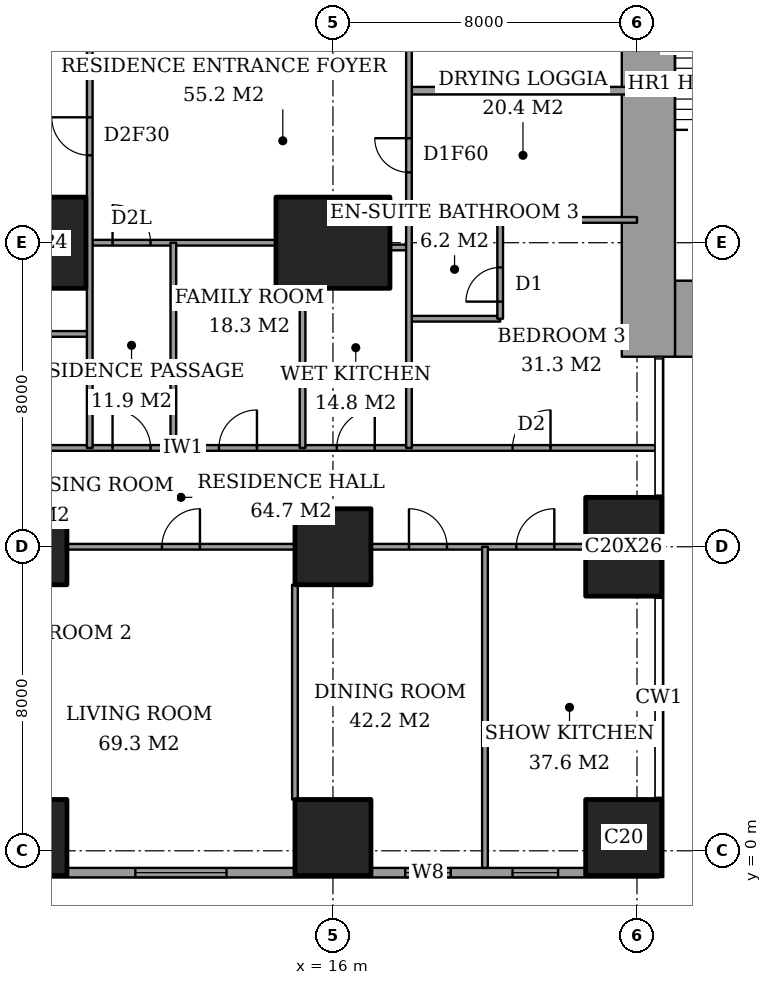
"""IFC4 building model, lengths in metres.
Left out: names, types, materials, properties, quantities, classifications, styles, units other than length and angle.
Written with IfcOpenShell. Run it as: python <this file> out.ifc"""

import sys

from ifc_helpers import new_model, si_unit, direction, frame, frame_2d, origin, origin_2d, place, context, subcontext, project, spatial, rectangle, extrude, element, fill, save


model = new_model("IFC4")
c1 = context("Model", 3, precision=1e-05, world=origin(), true_north=direction((0.0, 1.0)))
c2 = subcontext(c1, "Body", "Model", "MODEL_VIEW")
j1 = project(units=[si_unit("LENGTHUNIT", "METRE"), si_unit("PLANEANGLEUNIT", "RADIAN")], contexts=[c1])
p1 = place(None, origin())
s1 = spatial("IfcSite", under=j1, at=p1, CompositionType="ELEMENT")
p2 = place(p1, origin())
s2 = spatial("IfcBuilding", under=s1, at=p2, CompositionType="ELEMENT")
p3 = place(p2, frame((0.0, 0.0, 87.2)))
s3 = spatial("IfcBuildingStorey", under=s2, at=p3, CompositionType="ELEMENT", Elevation=87.2)
for number, where, z_axis, x_axis in (
    (1, (8.0, 0.35, 0.0), (0.0, 0.0, 1.0), (1.0, 0.0, 0.0)),
    (2, (8.0, 8.0, 0.0), (0.0, 0.0, 1.0), (1.0, 0.0, 0.0)),
):
    element("IfcColumn", number, at=place(p3, frame(where, z_axis=z_axis, x_axis=x_axis)), inside=s3, PredefinedType="COLUMN", context=c2, shape_type="SweptSolid", body=[
        extrude(rectangle(XDim=2.0, YDim=2.0, at=origin_2d()), origin(), (0.0, 0.0, 1.0), 3.6),
    ])
p4 = place(p3, frame((8.0, 16.0, 0.0), z_axis=(0.0, 0.0, 1.0), x_axis=(1.0, 0.0, 0.0)))
e3 = element("IfcColumn", 3, at=p4, inside=s3, PredefinedType="COLUMN", context=c2, shape_type="SweptSolid", body=[
    extrude(rectangle(XDim=3.0, YDim=2.4, at=origin_2d()), origin(), (0.0, 0.0, 1.0), 3.6),
])
for number, where, z_axis, x_axis in (
    (4, (16.0, 0.35, 0.0), (0.0, 0.0, 1.0), (1.0, 0.0, 0.0)),
    (5, (16.0, 8.0, 0.0), (0.0, 0.0, 1.0), (1.0, 0.0, 0.0)),
):
    element("IfcColumn", number, at=place(p3, frame(where, z_axis=z_axis, x_axis=x_axis)), inside=s3, PredefinedType="COLUMN", context=c2, shape_type="SweptSolid", body=[
        extrude(rectangle(XDim=2.0, YDim=2.0, at=origin_2d()), origin(), (0.0, 0.0, 1.0), 3.6),
    ])
p5 = place(p3, frame((16.0, 16.0, 0.0), z_axis=(0.0, 0.0, 1.0), x_axis=(1.0, 0.0, 0.0)))
e6 = element("IfcColumn", 6, at=p5, inside=s3, PredefinedType="COLUMN", context=c2, shape_type="SweptSolid", body=[
    extrude(rectangle(XDim=3.0, YDim=2.4, at=origin_2d()), origin(), (0.0, 0.0, 1.0), 3.6),
])
p6 = place(p3, frame((23.65, 0.35, 0.0), z_axis=(0.0, 0.0, 1.0), x_axis=(1.0, 0.0, 0.0)))
e7 = element("IfcColumn", 7, at=p6, inside=s3, PredefinedType="COLUMN", context=c2, shape_type="SweptSolid", body=[
    extrude(rectangle(XDim=2.0, YDim=2.0, at=origin_2d()), origin(), (0.0, 0.0, 1.0), 3.6),
])
p7 = place(p3, frame((23.65, 8.0, 0.0), z_axis=(0.0, 0.0, 1.0), x_axis=(1.0, 0.0, 0.0)))
e8 = element("IfcColumn", 8, at=p7, inside=s3, PredefinedType="COLUMN", context=c2, shape_type="SweptSolid", body=[
    extrude(rectangle(XDim=2.0, YDim=2.6, at=origin_2d()), origin(), (0.0, 0.0, 1.0), 3.6),
])
p8 = place(p3, frame((25.0, 14.0, 0.0), z_axis=(0.0, 0.0, 1.0), x_axis=(1.0, 0.0, 0.0)))
e9 = element("IfcWall", 9, at=p8, inside=s3, PredefinedType="SHEAR", context=c2, shape_type="SweptSolid", body=[
    extrude(rectangle(XDim=3.15, YDim=2.0, at=frame_2d((1.575, 0.0))), origin(), (0.0, 0.0, 1.0), 3.6),
])
p9 = place(p3, frame((24.3, 13.0, 0.0), z_axis=(0.0, 0.0, 1.0), x_axis=(0.0, 1.0, 0.0)))
e10 = element("IfcWall", 10, at=p9, inside=s3, PredefinedType="SHEAR", context=c2, shape_type="SweptSolid", body=[
    extrude(rectangle(XDim=10.15, YDim=1.4, at=frame_2d((5.075, 0.0))), origin(), (0.0, 0.0, 1.0), 3.6),
])
p10 = place(p3, frame((3.175, -0.575, 0.0), z_axis=(0.0, 0.0, 1.0), x_axis=(1.0, 0.0, 0.0)))
e11 = element("IfcWall", 11, at=p10, inside=s3, PredefinedType="SOLIDWALL", context=c2, shape_type="SweptSolid", body=[
    extrude(rectangle(XDim=21.4, YDim=0.25, at=frame_2d((10.7, 0.0))), origin(), (0.0, 0.0, 1.0), 3.6),
])
p11 = place(p10, frame((0.425, 0.0, 0.6)))
e12 = element("IfcOpeningElement", 12, at=p11, cuts=e11, PredefinedType="OPENING", context=c2, shape_type="SweptSolid", body=[
    extrude(rectangle(XDim=1.2, YDim=2.0, at=frame_2d((0.6, 1.0))), frame((0.0, 0.135, 0.0), z_axis=(0.0, -1.0, 0.0), x_axis=(1.0, 0.0, 0.0)), (0.0, 0.0, 1.0), 0.27),
])
p12 = place(p10, frame((2.1, 0.0, 0.6)))
e13 = element("IfcOpeningElement", 13, at=p12, cuts=e11, PredefinedType="OPENING", context=c2, shape_type="SweptSolid", body=[
    extrude(rectangle(XDim=1.2, YDim=2.0, at=frame_2d((0.6, 1.0))), frame((0.0, 0.135, 0.0), z_axis=(0.0, -1.0, 0.0), x_axis=(1.0, 0.0, 0.0)), (0.0, 0.0, 1.0), 0.27),
])
p13 = place(p10, frame((7.625, 0.0, 0.6)))
e14 = element("IfcOpeningElement", 14, at=p13, cuts=e11, PredefinedType="OPENING", context=c2, shape_type="SweptSolid", body=[
    extrude(rectangle(XDim=2.4, YDim=2.0, at=frame_2d((1.2, 1.0))), frame((0.0, 0.135, 0.0), z_axis=(0.0, -1.0, 0.0), x_axis=(1.0, 0.0, 0.0)), (0.0, 0.0, 1.0), 0.27),
])
p14 = place(p10, frame((14.725, 0.0, 0.6)))
e15 = element("IfcOpeningElement", 15, at=p14, cuts=e11, PredefinedType="OPENING", context=c2, shape_type="SweptSolid", body=[
    extrude(rectangle(XDim=1.2, YDim=2.0, at=frame_2d((0.6, 1.0))), frame((0.0, 0.135, 0.0), z_axis=(0.0, -1.0, 0.0), x_axis=(1.0, 0.0, 0.0)), (0.0, 0.0, 1.0), 0.27),
])
p15 = place(p10, frame((17.55, 0.0, 0.6)))
e16 = element("IfcOpeningElement", 16, at=p15, cuts=e11, PredefinedType="OPENING", context=c2, shape_type="SweptSolid", body=[
    extrude(rectangle(XDim=1.2, YDim=2.0, at=frame_2d((0.6, 1.0))), frame((0.0, 0.135, 0.0), z_axis=(0.0, -1.0, 0.0), x_axis=(1.0, 0.0, 0.0)), (0.0, 0.0, 1.0), 0.27),
])
p16 = place(p3, frame((9.0, 8.0, 0.0), z_axis=(0.0, 0.0, 1.0), x_axis=(1.0, 0.0, 0.0)))
e17 = element("IfcWall", 17, at=p16, inside=s3, PredefinedType="PARTITIONING", context=c2, shape_type="SweptSolid", body=[
    extrude(rectangle(XDim=6.0, YDim=0.15, at=frame_2d((3.0, 0.0))), origin(), (0.0, 0.0, 1.0), 3.25),
])
p17 = place(p16, frame((2.5, 0.0, 0.0)))
e18 = element("IfcOpeningElement", 18, at=p17, cuts=e17, PredefinedType="OPENING", context=c2, shape_type="SweptSolid", body=[
    extrude(rectangle(XDim=1.0, YDim=2.1, at=frame_2d((0.5, 1.05))), frame((0.0, 0.085, 0.0), z_axis=(0.0, -1.0, 0.0), x_axis=(1.0, 0.0, 0.0)), (0.0, 0.0, 1.0), 0.17),
])
p18 = place(p3, frame((17.0, 8.0, 0.0), z_axis=(0.0, 0.0, 1.0), x_axis=(1.0, 0.0, 0.0)))
e19 = element("IfcWall", 19, at=p18, inside=s3, PredefinedType="PARTITIONING", context=c2, shape_type="SweptSolid", body=[
    extrude(rectangle(XDim=5.65, YDim=0.15, at=frame_2d((2.825, 0.0))), origin(), (0.0, 0.0, 1.0), 3.25),
])
p19 = place(p18, frame((1.0, 0.0, 0.0)))
e20 = element("IfcOpeningElement", 20, at=p19, cuts=e19, PredefinedType="OPENING", context=c2, shape_type="SweptSolid", body=[
    extrude(rectangle(XDim=1.0, YDim=2.1, at=frame_2d((0.5, 1.05))), frame((0.0, 0.085, 0.0), z_axis=(0.0, -1.0, 0.0), x_axis=(1.0, 0.0, 0.0)), (0.0, 0.0, 1.0), 0.17),
])
p20 = place(p18, frame((3.825, 0.0, 0.0)))
e21 = element("IfcOpeningElement", 21, at=p20, cuts=e19, PredefinedType="OPENING", context=c2, shape_type="SweptSolid", body=[
    extrude(rectangle(XDim=1.0, YDim=2.1, at=frame_2d((0.5, 1.05))), frame((0.0, 0.085, 0.0), z_axis=(0.0, -1.0, 0.0), x_axis=(1.0, 0.0, 0.0)), (0.0, 0.0, 1.0), 0.17),
])
p21 = place(p3, frame((-0.45, 10.6, 0.0), z_axis=(0.0, 0.0, 1.0), x_axis=(1.0, 0.0, 0.0)))
e22 = element("IfcWall", 22, at=p21, inside=s3, PredefinedType="PARTITIONING", context=c2, shape_type="SweptSolid", body=[
    extrude(rectangle(XDim=25.011, YDim=0.15, at=frame_2d((12.505, 0.0))), origin(), (0.0, 0.0, 1.0), 3.25),
])
p22 = place(p21, frame((10.65, 0.0, 0.0)))
e23 = element("IfcOpeningElement", 23, at=p22, cuts=e22, PredefinedType="OPENING", context=c2, shape_type="SweptSolid", body=[
    extrude(rectangle(XDim=1.0, YDim=2.1, at=frame_2d((0.5, 1.05))), frame((0.0, 0.085, 0.0), z_axis=(0.0, -1.0, 0.0), x_axis=(1.0, 0.0, 0.0)), (0.0, 0.0, 1.0), 0.17),
])
p23 = place(p21, frame((3.087, 0.0, 0.0)))
e24 = element("IfcOpeningElement", 24, at=p23, cuts=e22, PredefinedType="OPENING", context=c2, shape_type="SweptSolid", body=[
    extrude(rectangle(XDim=1.0, YDim=2.1, at=frame_2d((0.5, 1.05))), frame((0.0, 0.085, 0.0), z_axis=(0.0, -1.0, 0.0), x_axis=(1.0, 0.0, 0.0)), (0.0, 0.0, 1.0), 0.17),
])
p24 = place(p21, frame((13.45, 0.0, 0.0)))
e25 = element("IfcOpeningElement", 25, at=p24, cuts=e22, PredefinedType="OPENING", context=c2, shape_type="SweptSolid", body=[
    extrude(rectangle(XDim=1.0, YDim=2.1, at=frame_2d((0.5, 1.05))), frame((0.0, 0.085, 0.0), z_axis=(0.0, -1.0, 0.0), x_axis=(1.0, 0.0, 0.0)), (0.0, 0.0, 1.0), 0.17),
])
p25 = place(p21, frame((16.55, 0.0, 0.0)))
e26 = element("IfcOpeningElement", 26, at=p25, cuts=e22, PredefinedType="OPENING", context=c2, shape_type="SweptSolid", body=[
    extrude(rectangle(XDim=1.0, YDim=2.1, at=frame_2d((0.5, 1.05))), frame((0.0, 0.085, 0.0), z_axis=(0.0, -1.0, 0.0), x_axis=(1.0, 0.0, 0.0)), (0.0, 0.0, 1.0), 0.17),
])
p26 = place(p21, frame((21.175, 0.0, 0.0)))
e27 = element("IfcOpeningElement", 27, at=p26, cuts=e22, PredefinedType="OPENING", context=c2, shape_type="SweptSolid", body=[
    extrude(rectangle(XDim=1.0, YDim=2.1, at=frame_2d((0.5, 1.05))), frame((0.0, 0.085, 0.0), z_axis=(0.0, -1.0, 0.0), x_axis=(1.0, 0.0, 0.0)), (0.0, 0.0, 1.0), 0.17),
])
p27 = place(p3, frame((6.725, 13.6, 0.0), z_axis=(0.0, 0.0, 1.0), x_axis=(1.0, 0.0, 0.0)))
e28 = element("IfcWall", 28, at=p27, inside=s3, PredefinedType="PARTITIONING", context=c2, shape_type="SweptSolid", body=[
    extrude(rectangle(XDim=2.875, YDim=0.15, at=frame_2d((1.438, 0.0))), origin(), (0.0, 0.0, 1.0), 3.25),
])
p28 = place(p3, frame((18.0, 14.0, 0.0), z_axis=(0.0, 0.0, 1.0), x_axis=(1.0, 0.0, 0.0)))
e29 = element("IfcWall", 29, at=p28, inside=s3, PredefinedType="PARTITIONING", context=c2, shape_type="SweptSolid", body=[
    extrude(rectangle(XDim=2.4, YDim=0.15, at=frame_2d((1.2, 0.0))), origin(), (0.0, 0.0, 1.0), 3.25),
])
p29 = place(p3, frame((17.5, 15.875, 0.0), z_axis=(0.0, 0.0, 1.0), x_axis=(1.0, 0.0, 0.0)))
e30 = element("IfcWall", 30, at=p29, inside=s3, PredefinedType="PARTITIONING", context=c2, shape_type="SweptSolid", body=[
    extrude(rectangle(XDim=0.5, YDim=0.15, at=frame_2d((0.25, 0.0))), origin(), (0.0, 0.0, 1.0), 3.25),
])
p30 = place(p3, frame((9.6, 16.0, 0.0), z_axis=(0.0, 0.0, 1.0), x_axis=(1.0, 0.0, 0.0)))
e31 = element("IfcWall", 31, at=p30, inside=s3, PredefinedType="PARTITIONING", context=c2, shape_type="SweptSolid", body=[
    extrude(rectangle(XDim=4.9, YDim=0.15, at=frame_2d((2.45, 0.0))), origin(), (0.0, 0.0, 1.0), 3.25),
])
p31 = place(p30, frame((0.6, 0.0, 0.0)))
e32 = element("IfcOpeningElement", 32, at=p31, cuts=e31, PredefinedType="OPENING", context=c2, shape_type="SweptSolid", body=[
    extrude(rectangle(XDim=1.0, YDim=2.0, at=frame_2d((0.5, 1.0))), frame((0.0, 0.085, 0.0), z_axis=(0.0, -1.0, 0.0), x_axis=(1.0, 0.0, 0.0)), (0.0, 0.0, 1.0), 0.17),
])
p32 = place(p3, frame((18.0, 16.6, 0.0), z_axis=(0.0, 0.0, 1.0), x_axis=(1.0, 0.0, 0.0)))
e33 = element("IfcWall", 33, at=p32, inside=s3, PredefinedType="PARTITIONING", context=c2, shape_type="SweptSolid", body=[
    extrude(rectangle(XDim=6.0, YDim=0.15, at=frame_2d((3.0, 0.0))), origin(), (0.0, 0.0, 1.0), 3.25),
])
p33 = place(p3, frame((18.0, 20.0, 0.0), z_axis=(0.0, 0.0, 1.0), x_axis=(1.0, 0.0, 0.0)))
e34 = element("IfcWall", 34, at=p33, inside=s3, PredefinedType="PARTITIONING", context=c2, shape_type="SweptSolid", body=[
    extrude(rectangle(XDim=6.0, YDim=0.2, at=frame_2d((3.0, 0.0))), origin(), (0.0, 0.0, 1.0), 3.25),
])
p34 = place(p3, frame((9.6, 10.6, 0.0), z_axis=(0.0, 0.0, 1.0), x_axis=(0.0, 1.0, 0.0)))
e35 = element("IfcWall", 35, at=p34, inside=s3, PredefinedType="PARTITIONING", context=c2, shape_type="SweptSolid", body=[
    extrude(rectangle(XDim=11.0, YDim=0.15, at=frame_2d((5.5, 0.0))), origin(), (0.0, 0.0, 1.0), 3.25),
])
p35 = place(p34, frame((7.7, 0.0, 0.0)))
e36 = element("IfcOpeningElement", 36, at=p35, cuts=e35, PredefinedType="OPENING", context=c2, shape_type="SweptSolid", body=[
    extrude(rectangle(XDim=1.0, YDim=2.1, at=frame_2d((0.5, 1.05))), frame((0.0, 0.085, 0.0), z_axis=(0.0, -1.0, 0.0), x_axis=(1.0, 0.0, 0.0)), (0.0, 0.0, 1.0), 0.17),
])
p36 = place(p3, frame((11.8, 10.6, 0.0), z_axis=(0.0, 0.0, 1.0), x_axis=(0.0, 1.0, 0.0)))
e37 = element("IfcWall", 37, at=p36, inside=s3, PredefinedType="PARTITIONING", context=c2, shape_type="SweptSolid", body=[
    extrude(rectangle(XDim=5.4, YDim=0.15, at=frame_2d((2.7, 0.0))), origin(), (0.0, 0.0, 1.0), 3.25),
])
p37 = place(p3, frame((15.0, 1.35, 0.0), z_axis=(0.0, 0.0, 1.0), x_axis=(0.0, 1.0, 0.0)))
e38 = element("IfcWall", 38, at=p37, inside=s3, PredefinedType="PARTITIONING", context=c2, shape_type="SweptSolid", body=[
    extrude(rectangle(XDim=5.65, YDim=0.15, at=frame_2d((2.825, 0.0))), origin(), (0.0, 0.0, 1.0), 3.25),
])
p38 = place(p3, frame((15.2, 10.6, 0.0), z_axis=(0.0, 0.0, 1.0), x_axis=(0.0, 1.0, 0.0)))
e39 = element("IfcWall", 39, at=p38, inside=s3, PredefinedType="PARTITIONING", context=c2, shape_type="SweptSolid", body=[
    extrude(rectangle(XDim=4.2, YDim=0.15, at=frame_2d((2.1, 0.0))), origin(), (0.0, 0.0, 1.0), 3.25),
])
p39 = place(p3, frame((18.0, 10.6, 0.0), z_axis=(0.0, 0.0, 1.0), x_axis=(0.0, 1.0, 0.0)))
e40 = element("IfcWall", 40, at=p39, inside=s3, PredefinedType="PARTITIONING", context=c2, shape_type="SweptSolid", body=[
    extrude(rectangle(XDim=13.4, YDim=0.15, at=frame_2d((6.7, 0.0))), origin(), (0.0, 0.0, 1.0), 3.25),
])
p40 = place(p39, frame((10.8, 0.0, 0.0)))
e41 = element("IfcOpeningElement", 41, at=p40, cuts=e40, PredefinedType="OPENING", context=c2, shape_type="SweptSolid", body=[
    extrude(rectangle(XDim=1.2, YDim=2.4, at=frame_2d((0.6, 1.2))), frame((0.0, 0.085, 0.0), z_axis=(0.0, -1.0, 0.0), x_axis=(1.0, 0.0, 0.0)), (0.0, 0.0, 1.0), 0.17),
])
p41 = place(p39, frame((7.25, 0.0, 0.0)))
e42 = element("IfcOpeningElement", 42, at=p41, cuts=e40, PredefinedType="OPENING", context=c2, shape_type="SweptSolid", body=[
    extrude(rectangle(XDim=0.9, YDim=2.1, at=frame_2d((0.45, 1.05))), frame((0.0, 0.085, 0.0), z_axis=(0.0, -1.0, 0.0), x_axis=(1.0, 0.0, 0.0)), (0.0, 0.0, 1.0), 0.17),
])
p42 = place(p3, frame((20.0, -0.45, 0.0), z_axis=(0.0, 0.0, 1.0), x_axis=(0.0, 1.0, 0.0)))
e43 = element("IfcWall", 43, at=p42, inside=s3, PredefinedType="PARTITIONING", context=c2, shape_type="SweptSolid", body=[
    extrude(rectangle(XDim=8.45, YDim=0.15, at=frame_2d((4.225, 0.0))), origin(), (0.0, 0.0, 1.0), 3.25),
])
p43 = place(p3, frame((20.4, 14.0, 0.0), z_axis=(0.0, 0.0, 1.0), x_axis=(0.0, 1.0, 0.0)))
e44 = element("IfcWall", 44, at=p43, inside=s3, PredefinedType="PARTITIONING", context=c2, shape_type="SweptSolid", body=[
    extrude(rectangle(XDim=2.6, YDim=0.15, at=frame_2d((1.3, 0.0))), origin(), (0.0, 0.0, 1.0), 3.25),
])
p44 = place(p43, frame((0.45, 0.0, 0.0)))
e45 = element("IfcOpeningElement", 45, at=p44, cuts=e44, PredefinedType="OPENING", context=c2, shape_type="SweptSolid", body=[
    extrude(rectangle(XDim=0.9, YDim=2.1, at=frame_2d((0.45, 1.05))), frame((0.0, 0.085, 0.0), z_axis=(0.0, -1.0, 0.0), x_axis=(1.0, 0.0, 0.0)), (0.0, 0.0, 1.0), 0.17),
])
p45 = place(p13, origin())
e46 = element("IfcWindow", 46, at=p45, inside=s3, PartitioningType="SINGLE_PANEL", PredefinedType="WINDOW", context=c2, shape_type="SweptSolid", body=[
    extrude(rectangle(XDim=2.4, YDim=2.0, at=frame_2d((1.2, 1.0))), frame((0.0, 0.03, 0.0), z_axis=(0.0, -1.0, 0.0), x_axis=(1.0, 0.0, 0.0)), (0.0, 0.0, 1.0), 0.06),
])
fill(e14, e46)
p46 = place(p14, origin())
e47 = element("IfcWindow", 47, at=p46, inside=s3, PartitioningType="SINGLE_PANEL", PredefinedType="WINDOW", context=c2, shape_type="SweptSolid", body=[
    extrude(rectangle(XDim=1.2, YDim=2.0, at=frame_2d((0.6, 1.0))), frame((0.0, 0.03, 0.0), z_axis=(0.0, -1.0, 0.0), x_axis=(1.0, 0.0, 0.0)), (0.0, 0.0, 1.0), 0.06),
])
fill(e15, e47)
p47 = place(p15, origin())
e48 = element("IfcWindow", 48, at=p47, inside=s3, PartitioningType="SINGLE_PANEL", PredefinedType="WINDOW", context=c2, shape_type="SweptSolid", body=[
    extrude(rectangle(XDim=1.2, YDim=2.0, at=frame_2d((0.6, 1.0))), frame((0.0, 0.03, 0.0), z_axis=(0.0, -1.0, 0.0), x_axis=(1.0, 0.0, 0.0)), (0.0, 0.0, 1.0), 0.06),
])
fill(e16, e48)
p48 = place(p17, origin())
e49 = element("IfcDoor", 49, at=p48, inside=s3, OperationType="SINGLE_SWING_LEFT", PredefinedType="DOOR", context=c2, shape_type="SweptSolid", body=[
    extrude(rectangle(XDim=1.0, YDim=2.1, at=frame_2d((0.5, 1.05))), frame((0.0, 0.025, 0.0), z_axis=(0.0, -1.0, 0.0), x_axis=(1.0, 0.0, 0.0)), (0.0, 0.0, 1.0), 0.05),
])
fill(e18, e49)
p49 = place(p19, origin())
e50 = element("IfcDoor", 50, at=p49, inside=s3, OperationType="SINGLE_SWING_RIGHT", PredefinedType="DOOR", context=c2, shape_type="SweptSolid", body=[
    extrude(rectangle(XDim=1.0, YDim=2.1, at=frame_2d((0.5, 1.05))), frame((0.0, 0.025, 0.0), z_axis=(0.0, -1.0, 0.0), x_axis=(1.0, 0.0, 0.0)), (0.0, 0.0, 1.0), 0.05),
])
fill(e20, e50)
p50 = place(p20, origin())
e51 = element("IfcDoor", 51, at=p50, inside=s3, OperationType="SINGLE_SWING_LEFT", PredefinedType="DOOR", context=c2, shape_type="SweptSolid", body=[
    extrude(rectangle(XDim=1.0, YDim=2.1, at=frame_2d((0.5, 1.05))), frame((0.0, 0.025, 0.0), z_axis=(0.0, -1.0, 0.0), x_axis=(1.0, 0.0, 0.0)), (0.0, 0.0, 1.0), 0.05),
])
fill(e21, e51)
p51 = place(p22, origin())
e52 = element("IfcDoor", 52, at=p51, inside=s3, OperationType="SINGLE_SWING_RIGHT", PredefinedType="DOOR", context=c2, shape_type="SweptSolid", body=[
    extrude(rectangle(XDim=1.0, YDim=2.1, at=frame_2d((0.5, 1.05))), frame((0.0, 0.025, 0.0), z_axis=(0.0, -1.0, 0.0), x_axis=(1.0, 0.0, 0.0)), (0.0, 0.0, 1.0), 0.05),
])
fill(e23, e52)
p52 = place(p35, origin())
e53 = element("IfcDoor", 53, at=p52, inside=s3, OperationType="SINGLE_SWING_LEFT", PredefinedType="DOOR", context=c2, shape_type="SweptSolid", body=[
    extrude(rectangle(XDim=1.0, YDim=2.1, at=frame_2d((0.5, 1.05))), frame((0.0, 0.025, 0.0), z_axis=(0.0, -1.0, 0.0), x_axis=(1.0, 0.0, 0.0)), (0.0, 0.0, 1.0), 0.05),
])
fill(e36, e53)
p53 = place(p31, origin())
e54 = element("IfcDoor", 54, at=p53, inside=s3, OperationType="SINGLE_SWING_RIGHT", PredefinedType="DOOR", context=c2, shape_type="SweptSolid", body=[
    extrude(rectangle(XDim=1.0, YDim=2.0, at=frame_2d((0.5, 1.0))), frame((0.0, 0.025, 0.0), z_axis=(0.0, -1.0, 0.0), x_axis=(1.0, 0.0, 0.0)), (0.0, 0.0, 1.0), 0.05),
])
fill(e32, e54)
p54 = place(p24, origin())
e55 = element("IfcDoor", 55, at=p54, inside=s3, OperationType="SINGLE_SWING_LEFT", PredefinedType="DOOR", context=c2, shape_type="SweptSolid", body=[
    extrude(rectangle(XDim=1.0, YDim=2.1, at=frame_2d((0.5, 1.05))), frame((0.0, 0.025, 0.0), z_axis=(0.0, -1.0, 0.0), x_axis=(1.0, 0.0, 0.0)), (0.0, 0.0, 1.0), 0.05),
])
fill(e25, e55)
p55 = place(p25, origin())
e56 = element("IfcDoor", 56, at=p55, inside=s3, OperationType="SINGLE_SWING_LEFT", PredefinedType="DOOR", context=c2, shape_type="SweptSolid", body=[
    extrude(rectangle(XDim=1.0, YDim=2.1, at=frame_2d((0.5, 1.05))), frame((0.0, 0.025, 0.0), z_axis=(0.0, -1.0, 0.0), x_axis=(1.0, 0.0, 0.0)), (0.0, 0.0, 1.0), 0.05),
])
fill(e26, e56)
p56 = place(p44, origin())
e57 = element("IfcDoor", 57, at=p56, inside=s3, OperationType="SINGLE_SWING_RIGHT", PredefinedType="DOOR", context=c2, shape_type="SweptSolid", body=[
    extrude(rectangle(XDim=0.9, YDim=2.1, at=frame_2d((0.45, 1.05))), frame((0.0, 0.025, 0.0), z_axis=(0.0, -1.0, 0.0), x_axis=(1.0, 0.0, 0.0)), (0.0, 0.0, 1.0), 0.05),
])
fill(e45, e57)
p57 = place(p26, origin())
e58 = element("IfcDoor", 58, at=p57, inside=s3, OperationType="SINGLE_SWING_LEFT", PredefinedType="DOOR", context=c2, shape_type="SweptSolid", body=[
    extrude(rectangle(XDim=1.0, YDim=2.1, at=frame_2d((0.5, 1.05))), frame((0.0, 0.025, 0.0), z_axis=(0.0, -1.0, 0.0), x_axis=(1.0, 0.0, 0.0)), (0.0, 0.0, 1.0), 0.05),
])
fill(e27, e58)
p58 = place(p41, origin())
e59 = element("IfcDoor", 59, at=p58, inside=s3, OperationType="SINGLE_SWING_LEFT", PredefinedType="DOOR", context=c2, shape_type="SweptSolid", body=[
    extrude(rectangle(XDim=0.9, YDim=2.1, at=frame_2d((0.45, 1.05))), frame((0.0, 0.025, 0.0), z_axis=(0.0, -1.0, 0.0), x_axis=(1.0, 0.0, 0.0)), (0.0, 0.0, 1.0), 0.05),
])
fill(e42, e59)
save(model, sys.argv[1])
